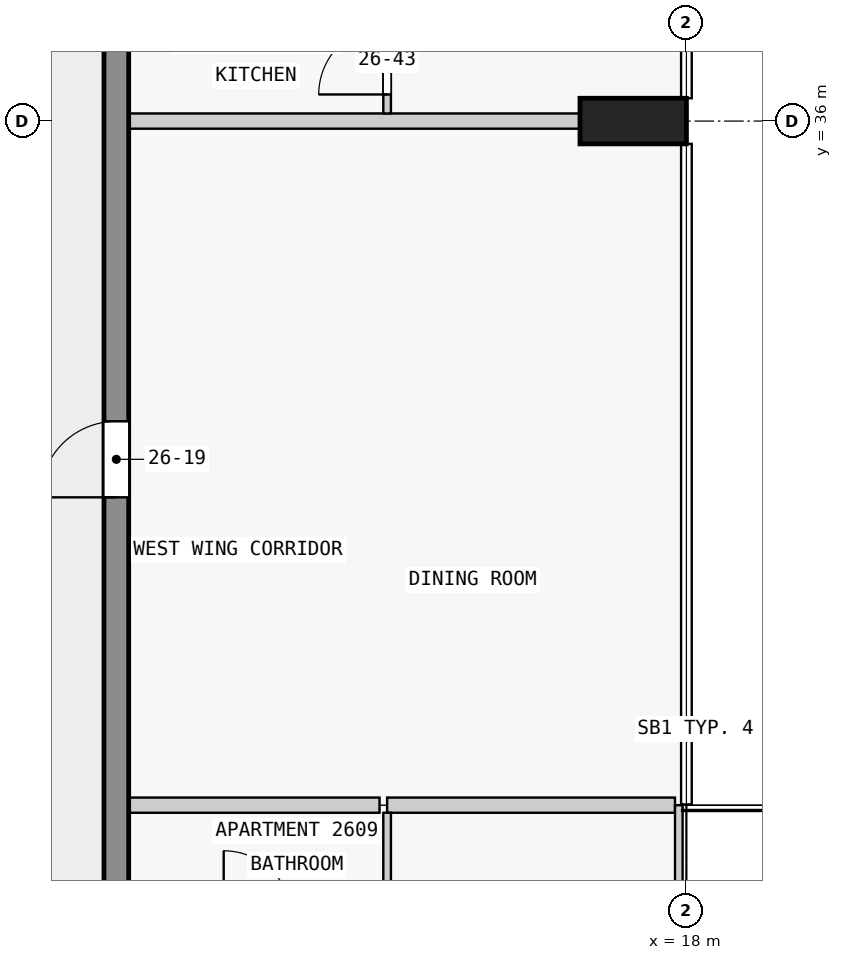
"""IFC4 building model, lengths in metres.
Left out: names, types, materials, properties, quantities, classifications, styles, units other than length and angle.
Written with IfcOpenShell. Run it as: python <this file> out.ifc"""

import sys

from ifc_helpers import new_model, si_unit, direction, frame, frame_2d, origin, origin_2d, place, context, subcontext, project, spatial, rectangle, extrude, element, fill, save


model = new_model("IFC4")
c1 = context("Model", 3, precision=1e-05, world=origin(), true_north=direction((0.0, 1.0)))
c2 = subcontext(c1, "Body", "Model", "MODEL_VIEW")
j1 = project(units=[si_unit("LENGTHUNIT", "METRE"), si_unit("PLANEANGLEUNIT", "RADIAN")], contexts=[c1])
p1 = place(None, origin())
s1 = spatial("IfcSite", under=j1, at=p1, CompositionType="ELEMENT")
p2 = place(p1, origin())
s2 = spatial("IfcBuilding", under=s1, at=p2, CompositionType="ELEMENT")
p3 = place(p2, frame((0.0, 0.0, 102.8)))
s3 = spatial("IfcBuildingStorey", under=s2, at=p3, CompositionType="ELEMENT", Elevation=102.8)
p4 = place(p3, frame((17.3, 36.0, 0.0), z_axis=(0.0, 0.0, 1.0), x_axis=(0.0, 1.0, 0.0)))
e1 = element("IfcColumn", 1, at=p4, inside=s3, PredefinedType="COLUMN", context=c2, shape_type="SweptSolid", body=[
    extrude(rectangle(XDim=0.6, YDim=1.4, at=origin_2d()), origin(), (0.0, 0.0, 1.0), 3.5),
])
p5 = place(p3, frame((10.5, 18.0, 0.0), z_axis=(0.0, 0.0, 1.0), x_axis=(0.0, 1.0, 0.0)))
e2 = element("IfcWall", 2, at=p5, inside=s3, PredefinedType="SHEAR", context=c2, shape_type="SweptSolid", body=[
    extrude(rectangle(XDim=27.0, YDim=0.325, at=frame_2d((13.5, 0.0))), origin(), (0.0, 0.0, 1.0), 3.25),
])
p6 = place(p5, frame((1.75, 0.0, 0.0)))
e3 = element("IfcOpeningElement", 3, at=p6, cuts=e2, PredefinedType="OPENING", context=c2, shape_type="SweptSolid", body=[
    extrude(rectangle(XDim=1.0, YDim=2.1, at=frame_2d((0.5, 1.05))), frame((0.0, 0.172, 0.0), z_axis=(0.0, -1.0, 0.0), x_axis=(1.0, 0.0, 0.0)), (0.0, 0.0, 1.0), 0.345),
])
p7 = place(p5, frame((6.25, 0.0, 0.0)))
e4 = element("IfcOpeningElement", 4, at=p7, cuts=e2, PredefinedType="OPENING", context=c2, shape_type="SweptSolid", body=[
    extrude(rectangle(XDim=1.0, YDim=2.1, at=frame_2d((0.5, 1.05))), frame((0.0, 0.172, 0.0), z_axis=(0.0, -1.0, 0.0), x_axis=(1.0, 0.0, 0.0)), (0.0, 0.0, 1.0), 0.345),
])
p8 = place(p5, frame((13.05, 0.0, 0.0)))
e5 = element("IfcOpeningElement", 5, at=p8, cuts=e2, PredefinedType="OPENING", context=c2, shape_type="SweptSolid", body=[
    extrude(rectangle(XDim=1.0, YDim=2.1, at=frame_2d((0.5, 1.05))), frame((0.0, 0.172, 0.0), z_axis=(0.0, -1.0, 0.0), x_axis=(1.0, 0.0, 0.0)), (0.0, 0.0, 1.0), 0.345),
])
p9 = place(p5, frame((21.35, 0.0, 0.0)))
e6 = element("IfcOpeningElement", 6, at=p9, cuts=e2, PredefinedType="OPENING", context=c2, shape_type="SweptSolid", body=[
    extrude(rectangle(XDim=1.0, YDim=2.1, at=frame_2d((0.5, 1.05))), frame((0.0, 0.172, 0.0), z_axis=(0.0, -1.0, 0.0), x_axis=(1.0, 0.0, 0.0)), (0.0, 0.0, 1.0), 0.345),
])
p10 = place(p3, frame((17.9, 27.0, 0.0), z_axis=(0.0, 0.0, 1.0), x_axis=(0.0, -1.0, 0.0)))
e7 = element("IfcWall", 7, at=p10, inside=s3, PredefinedType="STANDARD", context=c2, shape_type="SweptSolid", body=[
    extrude(rectangle(XDim=4.5, YDim=0.1, at=frame_2d((2.25, 0.0))), origin(), (0.0, 0.0, 1.0), 3.25),
])
p11 = place(p10, frame((1.05, 0.0, 0.0)))
e8 = element("IfcOpeningElement", 8, at=p11, cuts=e7, PredefinedType="OPENING", context=c2, shape_type="SweptSolid", body=[
    extrude(rectangle(XDim=2.4, YDim=2.4, at=frame_2d((1.2, 1.2))), frame((0.0, 0.06, 0.0), z_axis=(0.0, -1.0, 0.0), x_axis=(1.0, 0.0, 0.0)), (0.0, 0.0, 1.0), 0.12),
])
p12 = place(p3, frame((13.962, 27.0, 0.0), z_axis=(0.0, 0.0, 1.0), x_axis=(-1.0, 0.0, 0.0)))
e9 = element("IfcWall", 9, at=p12, inside=s3, PredefinedType="PARTITIONING", context=c2, shape_type="SweptSolid", body=[
    extrude(rectangle(XDim=3.3, YDim=0.2, at=frame_2d((1.65, 0.0))), origin(), (0.0, 0.0, 1.0), 3.25),
])
p13 = place(p3, frame((14.062, 27.0, 0.0), z_axis=(0.0, 0.0, 1.0), x_axis=(1.0, 0.0, 0.0)))
e10 = element("IfcWall", 10, at=p13, inside=s3, PredefinedType="PARTITIONING", context=c2, shape_type="SweptSolid", body=[
    extrude(rectangle(XDim=3.788, YDim=0.2, at=frame_2d((1.894, 0.0))), origin(), (0.0, 0.0, 1.0), 3.25),
])
p14 = place(p3, frame((16.6, 36.0, 0.0), z_axis=(0.0, 0.0, 1.0), x_axis=(-1.0, 0.0, 0.0)))
e11 = element("IfcWall", 11, at=p14, inside=s3, PredefinedType="PARTITIONING", context=c2, shape_type="SweptSolid", body=[
    extrude(rectangle(XDim=5.938, YDim=0.2, at=frame_2d((2.969, 0.0))), origin(), (0.0, 0.0, 1.0), 3.25),
])
p15 = place(p3, frame((14.062, 25.55, 0.0), z_axis=(0.0, 0.0, 1.0), x_axis=(0.0, 1.0, 0.0)))
e12 = element("IfcWall", 12, at=p15, inside=s3, PredefinedType="PARTITIONING", context=c2, shape_type="SweptSolid", body=[
    extrude(rectangle(XDim=1.35, YDim=0.1, at=frame_2d((0.675, 0.0))), origin(), (0.0, 0.0, 1.0), 3.25),
])
p16 = place(p3, frame((14.062, 36.1, 0.0), z_axis=(0.0, 0.0, 1.0), x_axis=(0.0, 1.0, 0.0)))
e13 = element("IfcWall", 13, at=p16, inside=s3, PredefinedType="PARTITIONING", context=c2, shape_type="SweptSolid", body=[
    extrude(rectangle(XDim=1.45, YDim=0.1, at=frame_2d((0.725, 0.0))), origin(), (0.0, 0.0, 1.0), 3.25),
])
p17 = place(p16, frame((0.25, 0.0, 0.0)))
e14 = element("IfcOpeningElement", 14, at=p17, cuts=e13, PredefinedType="OPENING", context=c2, shape_type="SweptSolid", body=[
    extrude(rectangle(XDim=0.9, YDim=2.1, at=frame_2d((0.45, 1.05))), frame((0.0, 0.06, 0.0), z_axis=(0.0, -1.0, 0.0), x_axis=(1.0, 0.0, 0.0)), (0.0, 0.0, 1.0), 0.12),
])
p18 = place(p8, origin())
e15 = element("IfcDoor", 15, at=p18, inside=s3, OperationType="SINGLE_SWING_RIGHT", PredefinedType="DOOR", context=c2, shape_type="SweptSolid", body=[
    extrude(rectangle(XDim=1.0, YDim=2.1, at=frame_2d((0.5, 1.05))), frame((0.0, 0.025, 0.0), z_axis=(0.0, -1.0, 0.0), x_axis=(1.0, 0.0, 0.0)), (0.0, 0.0, 1.0), 0.05),
])
fill(e5, e15)
p19 = place(p17, origin())
e16 = element("IfcDoor", 16, at=p19, inside=s3, OperationType="SINGLE_SWING_LEFT", PredefinedType="DOOR", context=c2, shape_type="SweptSolid", body=[
    extrude(rectangle(XDim=0.9, YDim=2.1, at=frame_2d((0.45, 1.05))), frame((0.0, 0.025, 0.0), z_axis=(0.0, -1.0, 0.0), x_axis=(1.0, 0.0, 0.0)), (0.0, 0.0, 1.0), 0.05),
])
fill(e14, e16)
save(model, sys.argv[1])
